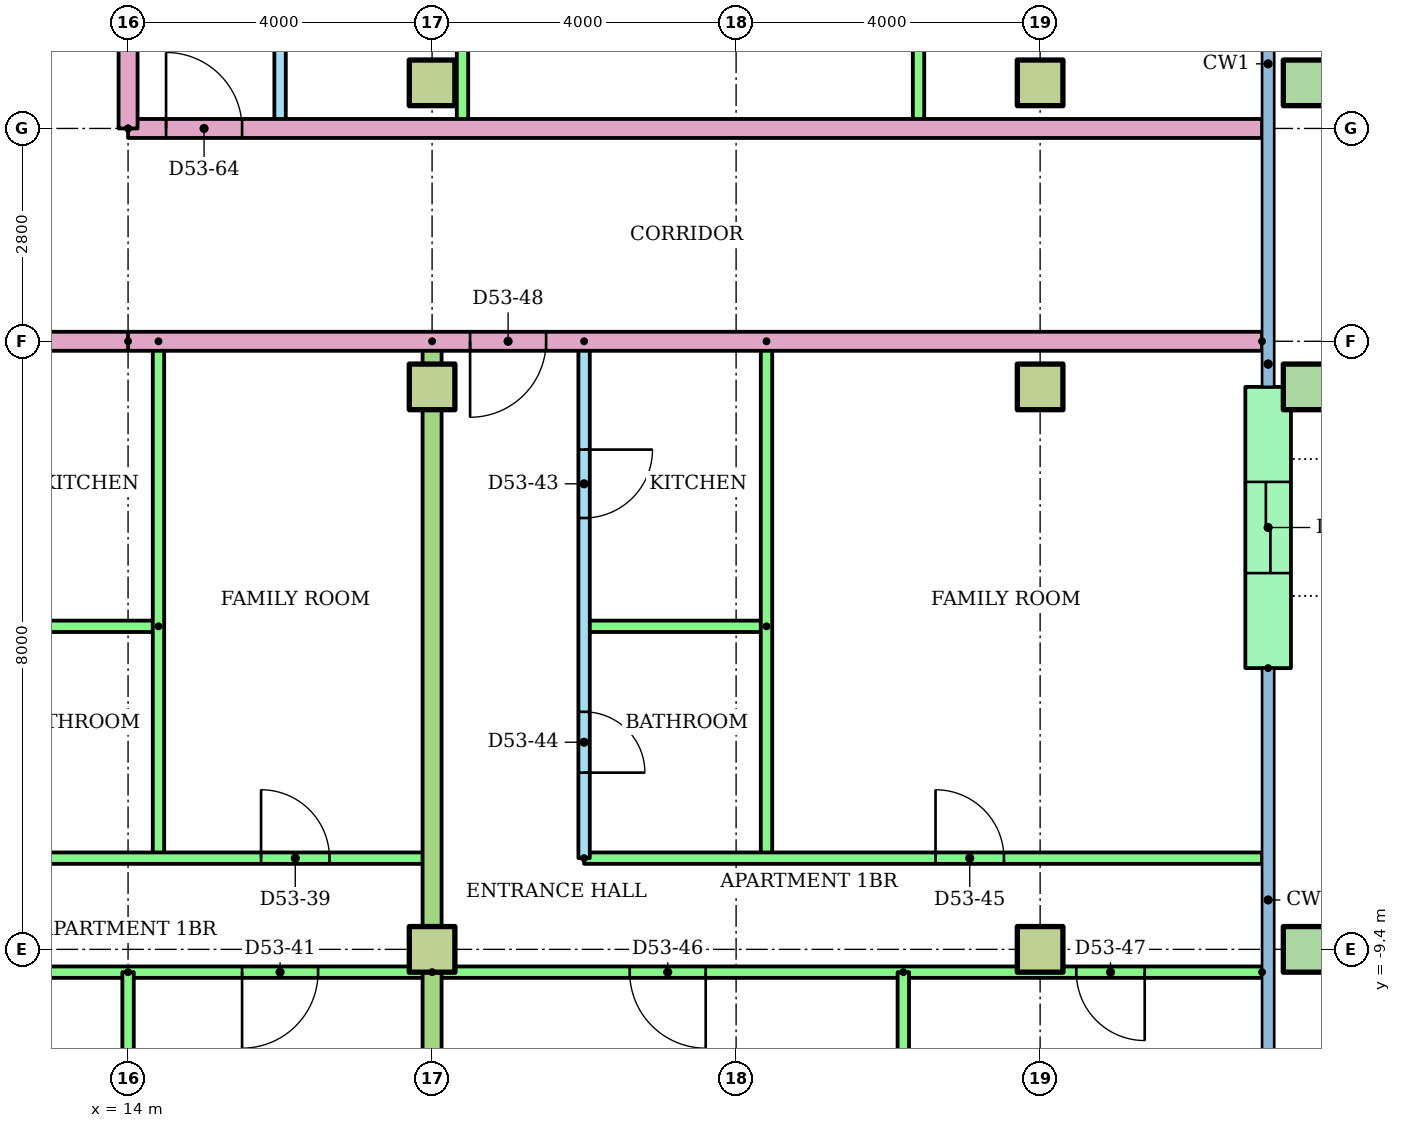
"""IFC4 building model, lengths in metres.
Left out: names, types, materials, properties, quantities, classifications, styles, units other than length and angle.
Written with IfcOpenShell. Run it as: python <this file> out.ifc"""

import sys

from ifc_helpers import new_model, si_unit, direction, frame, frame_2d, origin, origin_2d, place, context, subcontext, project, spatial, rectangle, hollow_rectangle, extrude, element, fill, save


model = new_model("IFC4")
c1 = context("Model", 3, precision=1e-05, world=origin(), true_north=direction((0.0, 1.0)))
c2 = subcontext(c1, "Body", "Model", "MODEL_VIEW")
j1 = project(units=[si_unit("LENGTHUNIT", "METRE"), si_unit("PLANEANGLEUNIT", "RADIAN")], contexts=[c1])
p1 = place(None, origin())
s1 = spatial("IfcSite", under=j1, at=p1, CompositionType="ELEMENT")
p2 = place(p1, origin())
s2 = spatial("IfcBuilding", under=s1, at=p2, CompositionType="ELEMENT")
p3 = place(p2, frame((0.0, 0.0, 207.6)))
s3 = spatial("IfcBuildingStorey", under=s2, at=p3, CompositionType="ELEMENT", Elevation=207.6)
for number, where in (
    (1, (18.0, -9.4, 0.0)),
    (2, (26.0, -9.4, 0.0)),
):
    element("IfcColumn", number, at=place(p3, frame(where)), inside=s3, PredefinedType="COLUMN", context=c2, shape_type="SweptSolid", body=[
        extrude(rectangle(XDim=0.6, YDim=0.6, at=origin_2d()), origin(), (0.0, 0.0, 1.0), 3.2),
    ])
p4 = place(p3, frame((29.5, -9.4, 0.0)))
e3 = element("IfcColumn", 3, at=p4, inside=s3, PredefinedType="COLUMN", context=c2, shape_type="SweptSolid", body=[
    extrude(hollow_rectangle(XDim=0.6, YDim=0.6, WallThickness=0.03, at=origin_2d()), origin(), (0.0, 0.0, 1.0), 3.2),
])
for number, where in (
    (4, (18.0, -2.0, 0.0)),
    (5, (26.0, -2.0, 0.0)),
):
    element("IfcColumn", number, at=place(p3, frame(where)), inside=s3, PredefinedType="COLUMN", context=c2, shape_type="SweptSolid", body=[
        extrude(rectangle(XDim=0.6, YDim=0.6, at=origin_2d()), origin(), (0.0, 0.0, 1.0), 3.2),
    ])
p5 = place(p3, frame((29.5, -2.0, 0.0)))
e6 = element("IfcColumn", 6, at=p5, inside=s3, PredefinedType="COLUMN", context=c2, shape_type="SweptSolid", body=[
    extrude(hollow_rectangle(XDim=0.6, YDim=0.6, WallThickness=0.03, at=origin_2d()), origin(), (0.0, 0.0, 1.0), 3.2),
])
for number, where in (
    (7, (18.0, 2.0, 0.0)),
    (8, (26.0, 2.0, 0.0)),
):
    element("IfcColumn", number, at=place(p3, frame(where)), inside=s3, PredefinedType="COLUMN", context=c2, shape_type="SweptSolid", body=[
        extrude(rectangle(XDim=0.6, YDim=0.6, at=origin_2d()), origin(), (0.0, 0.0, 1.0), 3.2),
    ])
p6 = place(p3, frame((29.5, 2.0, 0.0)))
e9 = element("IfcColumn", 9, at=p6, inside=s3, PredefinedType="COLUMN", context=c2, shape_type="SweptSolid", body=[
    extrude(hollow_rectangle(XDim=0.6, YDim=0.6, WallThickness=0.03, at=origin_2d()), origin(), (0.0, 0.0, 1.0), 3.2),
])
p7 = place(p3, frame((29.0, -5.7, 0.0), z_axis=(0.0, 0.0, 1.0), x_axis=(0.0, 1.0, 0.0)))
e10 = element("IfcWall", 10, at=p7, inside=s3, PredefinedType="STANDARD", context=c2, shape_type="SweptSolid", body=[
    extrude(rectangle(XDim=3.7, YDim=0.6, at=frame_2d((1.85, 0.0))), origin(), (0.0, 0.0, 1.0), 2.92),
])
p8 = place(p7, frame((1.25, 0.0, 0.0)))
e11 = element("IfcOpeningElement", 11, at=p8, cuts=e10, PredefinedType="OPENING", context=c2, shape_type="SweptSolid", body=[
    extrude(rectangle(XDim=1.2, YDim=2.1, at=frame_2d((0.6, 1.05))), frame((0.0, 0.31, 0.0), z_axis=(0.0, -1.0, 0.0), x_axis=(1.0, 0.0, 0.0)), (0.0, 0.0, 1.0), 0.62),
])
p9 = place(p3, frame((14.4, -5.15, 0.0), z_axis=(0.0, 0.0, 1.0), x_axis=(-1.0, 0.0, 0.0)))
e12 = element("IfcWall", 12, at=p9, inside=s3, PredefinedType="PARTITIONING", context=c2, shape_type="SweptSolid", body=[
    extrude(rectangle(XDim=2.4, YDim=0.15, at=frame_2d((1.2, 0.0))), origin(), (0.0, 0.0, 1.0), 2.4),
])
p10 = place(p3, frame((14.4, -1.4, 0.0), z_axis=(0.0, 0.0, 1.0), x_axis=(0.0, -1.0, 0.0)))
e13 = element("IfcWall", 13, at=p10, inside=s3, PredefinedType="PARTITIONING", context=c2, shape_type="SweptSolid", body=[
    extrude(rectangle(XDim=6.8, YDim=0.15, at=frame_2d((3.4, 0.0))), origin(), (0.0, 0.0, 1.0), 2.4),
])
p11 = place(p3, frame((12.0, -8.2, 0.0)))
e14 = element("IfcWall", 14, at=p11, inside=s3, PredefinedType="PARTITIONING", context=c2, shape_type="SweptSolid", body=[
    extrude(rectangle(XDim=6.0, YDim=0.15, at=frame_2d((3.0, 0.0))), origin(), (0.0, 0.0, 1.0), 2.4),
])
p12 = place(p11, frame((3.75, 0.0, 0.0)))
e15 = element("IfcOpeningElement", 15, at=p12, cuts=e14, PredefinedType="OPENING", context=c2, shape_type="SweptSolid", body=[
    extrude(rectangle(XDim=0.9, YDim=2.1, at=frame_2d((0.45, 1.05))), frame((0.0, 0.085, 0.0), z_axis=(0.0, -1.0, 0.0), x_axis=(1.0, 0.0, 0.0)), (0.0, 0.0, 1.0), 0.17),
])
p13 = place(p3, frame((18.0, -9.7, 0.0), z_axis=(0.0, 0.0, 1.0), x_axis=(-1.0, 0.0, 0.0)))
e16 = element("IfcWall", 16, at=p13, inside=s3, PredefinedType="PARTITIONING", context=c2, shape_type="SweptSolid", body=[
    extrude(rectangle(XDim=8.0, YDim=0.15, at=frame_2d((4.0, 0.0))), origin(), (0.0, 0.0, 1.0), 2.4),
])
p14 = place(p13, frame((5.55, 0.0, 0.0)))
e17 = element("IfcOpeningElement", 17, at=p14, cuts=e16, PredefinedType="OPENING", context=c2, shape_type="SweptSolid", body=[
    extrude(rectangle(XDim=0.9, YDim=2.1, at=frame_2d((0.45, 1.05))), frame((0.0, 0.085, 0.0), z_axis=(0.0, -1.0, 0.0), x_axis=(1.0, 0.0, 0.0)), (0.0, 0.0, 1.0), 0.17),
])
p15 = place(p13, frame((1.5, 0.0, 0.0)))
e18 = element("IfcOpeningElement", 18, at=p15, cuts=e16, PredefinedType="OPENING", context=c2, shape_type="SweptSolid", body=[
    extrude(rectangle(XDim=1.0, YDim=2.1, at=frame_2d((0.5, 1.05))), frame((0.0, 0.085, 0.0), z_axis=(0.0, -1.0, 0.0), x_axis=(1.0, 0.0, 0.0)), (0.0, 0.0, 1.0), 0.17),
])
p16 = place(p3, frame((14.0, -9.7, 0.0), z_axis=(0.0, 0.0, 1.0), x_axis=(0.0, -1.0, 0.0)))
e19 = element("IfcWall", 19, at=p16, inside=s3, PredefinedType="PARTITIONING", context=c2, shape_type="SweptSolid", body=[
    extrude(rectangle(XDim=6.821, YDim=0.15, at=frame_2d((3.411, 0.0))), origin(), (0.0, 0.0, 1.0), 2.4),
])
p17 = place(p3, frame((20.0, -1.4, 0.0), z_axis=(0.0, 0.0, 1.0), x_axis=(0.0, -1.0, 0.0)))
e20 = element("IfcWall", 20, at=p17, inside=s3, PredefinedType="PARTITIONING", context=c2, shape_type="SweptSolid", body=[
    extrude(rectangle(XDim=6.8, YDim=0.15, at=frame_2d((3.4, 0.0))), origin(), (0.0, 0.0, 1.0), 2.4),
])
p18 = place(p17, frame((1.425, 0.0, 0.0)))
e21 = element("IfcOpeningElement", 21, at=p18, cuts=e20, PredefinedType="OPENING", context=c2, shape_type="SweptSolid", body=[
    extrude(rectangle(XDim=0.9, YDim=2.1, at=frame_2d((0.45, 1.05))), frame((0.0, 0.085, 0.0), z_axis=(0.0, -1.0, 0.0), x_axis=(1.0, 0.0, 0.0)), (0.0, 0.0, 1.0), 0.17),
])
p19 = place(p17, frame((4.875, 0.0, 0.0)))
e22 = element("IfcOpeningElement", 22, at=p19, cuts=e20, PredefinedType="OPENING", context=c2, shape_type="SweptSolid", body=[
    extrude(rectangle(XDim=0.8, YDim=2.1, at=frame_2d((0.4, 1.05))), frame((0.0, 0.085, 0.0), z_axis=(0.0, -1.0, 0.0), x_axis=(1.0, 0.0, 0.0)), (0.0, 0.0, 1.0), 0.17),
])
p20 = place(p3, frame((22.4, -5.15, 0.0), z_axis=(0.0, 0.0, 1.0), x_axis=(-1.0, 0.0, 0.0)))
e23 = element("IfcWall", 23, at=p20, inside=s3, PredefinedType="PARTITIONING", context=c2, shape_type="SweptSolid", body=[
    extrude(rectangle(XDim=2.4, YDim=0.15, at=frame_2d((1.2, 0.0))), origin(), (0.0, 0.0, 1.0), 2.4),
])
p21 = place(p3, frame((22.4, -1.4, 0.0), z_axis=(0.0, 0.0, 1.0), x_axis=(0.0, -1.0, 0.0)))
e24 = element("IfcWall", 24, at=p21, inside=s3, PredefinedType="PARTITIONING", context=c2, shape_type="SweptSolid", body=[
    extrude(rectangle(XDim=6.8, YDim=0.15, at=frame_2d((3.4, 0.0))), origin(), (0.0, 0.0, 1.0), 2.4),
])
p22 = place(p3, frame((20.0, -8.2, 0.0)))
e25 = element("IfcWall", 25, at=p22, inside=s3, PredefinedType="PARTITIONING", context=c2, shape_type="SweptSolid", body=[
    extrude(rectangle(XDim=8.92, YDim=0.15, at=frame_2d((4.46, 0.0))), origin(), (0.0, 0.0, 1.0), 2.4),
])
p23 = place(p22, frame((4.624, 0.0, 0.0)))
e26 = element("IfcOpeningElement", 26, at=p23, cuts=e25, PredefinedType="OPENING", context=c2, shape_type="SweptSolid", body=[
    extrude(rectangle(XDim=0.9, YDim=2.1, at=frame_2d((0.45, 1.05))), frame((0.0, 0.085, 0.0), z_axis=(0.0, -1.0, 0.0), x_axis=(1.0, 0.0, 0.0)), (0.0, 0.0, 1.0), 0.17),
])
p24 = place(p3, frame((28.92, -9.7, 0.0), z_axis=(0.0, 0.0, 1.0), x_axis=(-1.0, 0.0, 0.0)))
e27 = element("IfcWall", 27, at=p24, inside=s3, PredefinedType="PARTITIONING", context=c2, shape_type="SweptSolid", body=[
    extrude(rectangle(XDim=10.92, YDim=0.15, at=frame_2d((5.46, 0.0))), origin(), (0.0, 0.0, 1.0), 2.4),
])
p25 = place(p24, frame((7.32, 0.0, 0.0)))
e28 = element("IfcOpeningElement", 28, at=p25, cuts=e27, PredefinedType="OPENING", context=c2, shape_type="SweptSolid", body=[
    extrude(rectangle(XDim=1.0, YDim=2.1, at=frame_2d((0.5, 1.05))), frame((0.0, 0.085, 0.0), z_axis=(0.0, -1.0, 0.0), x_axis=(1.0, 0.0, 0.0)), (0.0, 0.0, 1.0), 0.17),
])
p26 = place(p24, frame((1.544, 0.0, 0.0)))
e29 = element("IfcOpeningElement", 29, at=p26, cuts=e27, PredefinedType="OPENING", context=c2, shape_type="SweptSolid", body=[
    extrude(rectangle(XDim=0.9, YDim=2.1, at=frame_2d((0.45, 1.05))), frame((0.0, 0.085, 0.0), z_axis=(0.0, -1.0, 0.0), x_axis=(1.0, 0.0, 0.0)), (0.0, 0.0, 1.0), 0.17),
])
p27 = place(p3, frame((24.2, -9.7, 0.0), z_axis=(0.0, 0.0, 1.0), x_axis=(0.0, -1.0, 0.0)))
e30 = element("IfcWall", 30, at=p27, inside=s3, PredefinedType="PARTITIONING", context=c2, shape_type="SweptSolid", body=[
    extrude(rectangle(XDim=5.02, YDim=0.15, at=frame_2d((2.51, 0.0))), origin(), (0.0, 0.0, 1.0), 2.4),
])
p28 = place(p3, frame((18.0, -1.4, 0.0), z_axis=(0.0, 0.0, 1.0), x_axis=(0.0, -1.0, 0.0)))
e31 = element("IfcWall", 31, at=p28, inside=s3, PredefinedType="PARTITIONING", context=c2, shape_type="SweptSolid", body=[
    extrude(rectangle(XDim=15.11, YDim=0.25, at=frame_2d((7.555, 0.0))), origin(), (0.0, 0.0, 1.0), 2.4),
])
p29 = place(p3, frame((28.92, -1.4, 0.0), z_axis=(0.0, 0.0, 1.0), x_axis=(-1.0, 0.0, 0.0)))
e32 = element("IfcWall", 32, at=p29, inside=s3, PredefinedType="PARTITIONING", context=c2, shape_type="SweptSolid", body=[
    extrude(rectangle(XDim=14.92, YDim=0.25, at=frame_2d((7.46, 0.0))), origin(), (0.0, 0.0, 1.0), 2.4),
])
p30 = place(p29, frame((9.42, 0.0, 0.0)))
e33 = element("IfcOpeningElement", 33, at=p30, cuts=e32, PredefinedType="OPENING", context=c2, shape_type="SweptSolid", body=[
    extrude(rectangle(XDim=1.0, YDim=2.1, at=frame_2d((0.5, 1.05))), frame((0.0, 0.135, 0.0), z_axis=(0.0, -1.0, 0.0), x_axis=(1.0, 0.0, 0.0)), (0.0, 0.0, 1.0), 0.27),
])
p31 = place(p3, frame((16.0, 10.6, 0.0), z_axis=(0.0, 0.0, 1.0), x_axis=(0.0, -1.0, 0.0)))
e34 = element("IfcWall", 34, at=p31, inside=s3, PredefinedType="PARTITIONING", context=c2, shape_type="SweptSolid", body=[
    extrude(rectangle(XDim=9.2, YDim=0.15, at=frame_2d((4.6, 0.0))), origin(), (0.0, 0.0, 1.0), 2.4),
])
p32 = place(p31, frame((6.25, 0.0, 0.0)))
e35 = element("IfcOpeningElement", 35, at=p32, cuts=e34, PredefinedType="OPENING", context=c2, shape_type="SweptSolid", body=[
    extrude(rectangle(XDim=0.9, YDim=2.1, at=frame_2d((0.45, 1.05))), frame((0.0, 0.085, 0.0), z_axis=(0.0, -1.0, 0.0), x_axis=(1.0, 0.0, 0.0)), (0.0, 0.0, 1.0), 0.17),
])
p33 = place(p31, frame((1.7, 0.0, 0.0)))
e36 = element("IfcOpeningElement", 36, at=p33, cuts=e34, PredefinedType="OPENING", context=c2, shape_type="SweptSolid", body=[
    extrude(rectangle(XDim=0.8, YDim=2.1, at=frame_2d((0.4, 1.05))), frame((0.0, 0.085, 0.0), z_axis=(0.0, -1.0, 0.0), x_axis=(1.0, 0.0, 0.0)), (0.0, 0.0, 1.0), 0.17),
])
for number, where, z_axis, x_axis in (
    (37, (18.4, 10.6, 0.0), (0.0, 0.0, 1.0), (0.0, -1.0, 0.0)),
    (38, (24.4, 10.6, 0.0), (0.0, 0.0, 1.0), (0.0, -1.0, 0.0)),
):
    element("IfcWall", number, at=place(p3, frame(where, z_axis=z_axis, x_axis=x_axis)), inside=s3, PredefinedType="PARTITIONING", context=c2, shape_type="SweptSolid", body=[
        extrude(rectangle(XDim=9.2, YDim=0.15, at=frame_2d((4.6, 0.0))), origin(), (0.0, 0.0, 1.0), 2.4),
    ])
p34 = place(p3, frame((14.0, 1.4, 0.0)))
e39 = element("IfcWall", 39, at=p34, inside=s3, PredefinedType="PARTITIONING", context=c2, shape_type="SweptSolid", body=[
    extrude(rectangle(XDim=14.92, YDim=0.25, at=frame_2d((7.46, 0.0))), origin(), (0.0, 0.0, 1.0), 2.4),
])
p35 = place(p34, frame((0.5, 0.0, 0.0)))
e40 = element("IfcOpeningElement", 40, at=p35, cuts=e39, PredefinedType="OPENING", context=c2, shape_type="SweptSolid", body=[
    extrude(rectangle(XDim=1.0, YDim=2.1, at=frame_2d((0.5, 1.05))), frame((0.0, 0.135, 0.0), z_axis=(0.0, -1.0, 0.0), x_axis=(1.0, 0.0, 0.0)), (0.0, 0.0, 1.0), 0.27),
])
p36 = place(p3, frame((14.0, -1.4, 0.0), z_axis=(0.0, 0.0, 1.0), x_axis=(-1.0, 0.0, 0.0)))
e41 = element("IfcWall", 41, at=p36, inside=s3, PredefinedType="PARTITIONING", context=c2, shape_type="SweptSolid", body=[
    extrude(rectangle(XDim=28.0, YDim=0.25, at=frame_2d((14.0, 0.0))), origin(), (0.0, 0.0, 1.0), 2.4),
])
p37 = place(p36, frame((4.5, 0.0, 0.0)))
e42 = element("IfcOpeningElement", 42, at=p37, cuts=e41, PredefinedType="OPENING", context=c2, shape_type="SweptSolid", body=[
    extrude(rectangle(XDim=1.0, YDim=2.1, at=frame_2d((0.5, 1.05))), frame((0.0, 0.135, 0.0), z_axis=(0.0, -1.0, 0.0), x_axis=(1.0, 0.0, 0.0)), (0.0, 0.0, 1.0), 0.27),
])
p38 = place(p36, frame((2.5, 0.0, 0.0)))
e43 = element("IfcOpeningElement", 43, at=p38, cuts=e41, PredefinedType="OPENING", context=c2, shape_type="SweptSolid", body=[
    extrude(rectangle(XDim=1.0, YDim=2.1, at=frame_2d((0.5, 1.05))), frame((0.0, 0.135, 0.0), z_axis=(0.0, -1.0, 0.0), x_axis=(1.0, 0.0, 0.0)), (0.0, 0.0, 1.0), 0.27),
])
p39 = place(p3, frame((14.0, 1.4, 0.0), z_axis=(0.0, 0.0, 1.0), x_axis=(0.0, 1.0, 0.0)))
e44 = element("IfcWall", 44, at=p39, inside=s3, PredefinedType="PARTITIONING", context=c2, shape_type="SweptSolid", body=[
    extrude(rectangle(XDim=1.6, YDim=0.25, at=frame_2d((0.8, 0.0))), origin(), (0.0, 0.0, 1.0), 2.4),
])
p40 = place(p12, origin())
e45 = element("IfcDoor", 45, at=p40, inside=s3, OperationType="SINGLE_SWING_LEFT", PredefinedType="DOOR", context=c2, shape_type="SweptSolid", body=[
    extrude(rectangle(XDim=0.9, YDim=2.1, at=frame_2d((0.45, 1.05))), frame((0.0, 0.025, 0.0), z_axis=(0.0, -1.0, 0.0), x_axis=(1.0, 0.0, 0.0)), (0.0, 0.0, 1.0), 0.05),
])
fill(e15, e45)
p41 = place(p15, origin())
e46 = element("IfcDoor", 46, at=p41, inside=s3, OperationType="SINGLE_SWING_RIGHT", PredefinedType="DOOR", context=c2, shape_type="SweptSolid", body=[
    extrude(rectangle(XDim=1.0, YDim=2.1, at=frame_2d((0.5, 1.05))), frame((0.0, 0.025, 0.0), z_axis=(0.0, -1.0, 0.0), x_axis=(1.0, 0.0, 0.0)), (0.0, 0.0, 1.0), 0.05),
])
fill(e18, e46)
p42 = place(p18, origin())
e47 = element("IfcDoor", 47, at=p42, inside=s3, OperationType="SINGLE_SWING_LEFT", PredefinedType="DOOR", context=c2, shape_type="SweptSolid", body=[
    extrude(rectangle(XDim=0.9, YDim=2.1, at=frame_2d((0.45, 1.05))), frame((0.0, 0.025, 0.0), z_axis=(0.0, -1.0, 0.0), x_axis=(1.0, 0.0, 0.0)), (0.0, 0.0, 1.0), 0.05),
])
fill(e21, e47)
p43 = place(p19, origin())
e48 = element("IfcDoor", 48, at=p43, inside=s3, OperationType="SINGLE_SWING_RIGHT", PredefinedType="DOOR", context=c2, shape_type="SweptSolid", body=[
    extrude(rectangle(XDim=0.8, YDim=2.1, at=frame_2d((0.4, 1.05))), frame((0.0, 0.025, 0.0), z_axis=(0.0, -1.0, 0.0), x_axis=(1.0, 0.0, 0.0)), (0.0, 0.0, 1.0), 0.05),
])
fill(e22, e48)
p44 = place(p23, origin())
e49 = element("IfcDoor", 49, at=p44, inside=s3, OperationType="SINGLE_SWING_LEFT", PredefinedType="DOOR", context=c2, shape_type="SweptSolid", body=[
    extrude(rectangle(XDim=0.9, YDim=2.1, at=frame_2d((0.45, 1.05))), frame((0.0, 0.025, 0.0), z_axis=(0.0, -1.0, 0.0), x_axis=(1.0, 0.0, 0.0)), (0.0, 0.0, 1.0), 0.05),
])
fill(e26, e49)
p45 = place(p25, origin())
e50 = element("IfcDoor", 50, at=p45, inside=s3, OperationType="SINGLE_SWING_LEFT", PredefinedType="DOOR", context=c2, shape_type="SweptSolid", body=[
    extrude(rectangle(XDim=1.0, YDim=2.1, at=frame_2d((0.5, 1.05))), frame((0.0, 0.025, 0.0), z_axis=(0.0, -1.0, 0.0), x_axis=(1.0, 0.0, 0.0)), (0.0, 0.0, 1.0), 0.05),
])
fill(e28, e50)
p46 = place(p26, origin())
e51 = element("IfcDoor", 51, at=p46, inside=s3, OperationType="SINGLE_SWING_LEFT", PredefinedType="DOOR", context=c2, shape_type="SweptSolid", body=[
    extrude(rectangle(XDim=0.9, YDim=2.1, at=frame_2d((0.45, 1.05))), frame((0.0, 0.025, 0.0), z_axis=(0.0, -1.0, 0.0), x_axis=(1.0, 0.0, 0.0)), (0.0, 0.0, 1.0), 0.05),
])
fill(e29, e51)
p47 = place(p30, origin())
e52 = element("IfcDoor", 52, at=p47, inside=s3, OperationType="SINGLE_SWING_RIGHT", PredefinedType="DOOR", context=c2, shape_type="SweptSolid", body=[
    extrude(rectangle(XDim=1.0, YDim=2.1, at=frame_2d((0.5, 1.05))), frame((0.0, 0.025, 0.0), z_axis=(0.0, -1.0, 0.0), x_axis=(1.0, 0.0, 0.0)), (0.0, 0.0, 1.0), 0.05),
])
fill(e33, e52)
p48 = place(p35, origin())
e53 = element("IfcDoor", 53, at=p48, inside=s3, OperationType="SINGLE_SWING_LEFT", PredefinedType="DOOR", context=c2, shape_type="SweptSolid", body=[
    extrude(rectangle(XDim=1.0, YDim=2.1, at=frame_2d((0.5, 1.05))), frame((0.0, 0.025, 0.0), z_axis=(0.0, -1.0, 0.0), x_axis=(1.0, 0.0, 0.0)), (0.0, 0.0, 1.0), 0.05),
])
fill(e40, e53)
p49 = place(p8, origin())
e54 = element("IfcDoor", 54, at=p49, inside=s3, OperationType="SLIDING_TO_LEFT", PredefinedType="DOOR", context=c2, shape_type="SweptSolid", body=[
    extrude(rectangle(XDim=1.2, YDim=2.1, at=frame_2d((0.6, 1.05))), frame((0.0, 0.025, 0.0), z_axis=(0.0, -1.0, 0.0), x_axis=(1.0, 0.0, 0.0)), (0.0, 0.0, 1.0), 0.05),
])
fill(e11, e54)
save(model, sys.argv[1])
